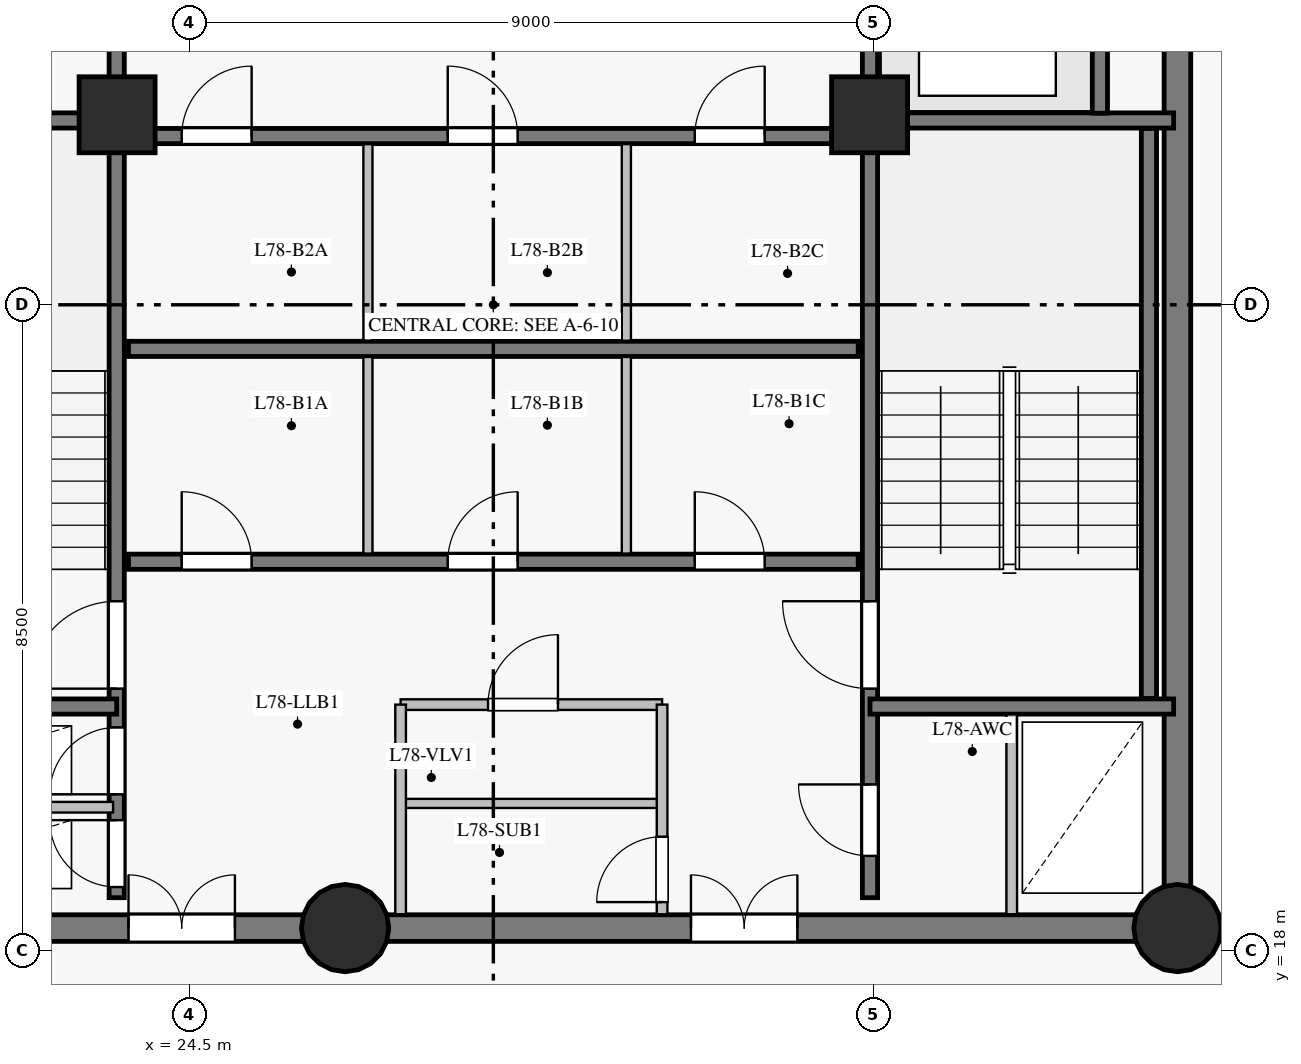
"""IFC4 building model, lengths in metres.
Left out: names, types, materials, properties, quantities, classifications, styles, units other than length and angle.
Written with IfcOpenShell. Run it as: python <this file> out.ifc"""

import sys

from ifc_helpers import new_model, si_unit, direction, frame, frame_2d, origin, origin_with_axes, origin_2d, place, context, subcontext, project, spatial, rectangle, circle, extrude, source, transform, mapped, element, fill, save


model = new_model("IFC4")
c1 = context("Model", 3, precision=1e-05, world=origin(), true_north=direction((0.0, 1.0)))
c2 = subcontext(c1, "Body", "Model", "MODEL_VIEW")
j1 = project(units=[si_unit("LENGTHUNIT", "METRE"), si_unit("PLANEANGLEUNIT", "RADIAN")], contexts=[c1])
p1 = place(None, origin())
s1 = spatial("IfcSite", under=j1, at=p1, CompositionType="ELEMENT")
p2 = place(p1, origin())
s2 = spatial("IfcBuilding", under=s1, at=p2, CompositionType="ELEMENT")
p3 = place(p2, frame((0.0, 0.0, 262.65)))
s3 = spatial("IfcBuildingStorey", under=s2, at=p3, CompositionType="ELEMENT", Elevation=262.65)
p4 = place(p3, frame((19.5, 18.3, 0.0), z_axis=(0.0, 0.0, 1.0), x_axis=(1.0, 0.0, 0.0)))
e1 = element("IfcWall", 1, at=p4, inside=s3, PredefinedType="SHEAR", context=c2, shape_type="SweptSolid", body=[
    extrude(rectangle(XDim=7.05, YDim=0.35, at=frame_2d((3.525, 0.0))), origin(), (0.0, 0.0, 1.0), 2.85),
])
p5 = place(p4, frame((4.2, 0.0, 0.0)))
e2 = element("IfcOpeningElement", 2, at=p5, cuts=e1, PredefinedType="OPENING", context=c2, shape_type="SweptSolid", body=[
    extrude(rectangle(XDim=1.4, YDim=2.2, at=frame_2d((0.7, 1.1))), frame((0.0, 0.185, 0.0), z_axis=(0.0, -1.0, 0.0), x_axis=(1.0, 0.0, 0.0)), (0.0, 0.0, 1.0), 0.37),
])
p6 = place(p3, frame((26.55, 18.3, 0.0), z_axis=(0.0, 0.0, 1.0), x_axis=(1.0, 0.0, 0.0)))
e3 = element("IfcWall", 3, at=p6, inside=s3, PredefinedType="SHEAR", context=c2, shape_type="SweptSolid", body=[
    extrude(rectangle(XDim=10.95, YDim=0.35, at=frame_2d((5.475, 0.0))), origin(), (0.0, 0.0, 1.0), 2.85),
])
p7 = place(p6, frame((4.55, 0.0, 0.0)))
e4 = element("IfcOpeningElement", 4, at=p7, cuts=e3, PredefinedType="OPENING", context=c2, shape_type="SweptSolid", body=[
    extrude(rectangle(XDim=1.4, YDim=2.2, at=frame_2d((0.7, 1.1))), frame((0.0, 0.185, 0.0), z_axis=(0.0, -1.0, 0.0), x_axis=(1.0, 0.0, 0.0)), (0.0, 0.0, 1.0), 0.37),
])
p8 = place(p3, frame((37.5, 18.3, 0.0), z_axis=(0.0, 0.0, 1.0), x_axis=(0.0, 1.0, 0.0)))
e5 = element("IfcWall", 5, at=p8, inside=s3, PredefinedType="SHEAR", context=c2, shape_type="SweptSolid", body=[
    extrude(rectangle(XDim=16.4, YDim=0.35, at=frame_2d((8.2, 0.0))), origin(), (0.0, 0.0, 1.0), 2.85),
])
p9 = place(p8, frame((13.85, 0.0, 0.0)))
e6 = element("IfcOpeningElement", 6, at=p9, cuts=e5, PredefinedType="OPENING", context=c2, shape_type="SweptSolid", body=[
    extrude(rectangle(XDim=1.2, YDim=2.15, at=frame_2d((0.6, 1.075))), frame((0.0, 0.185, 0.0), z_axis=(0.0, -1.0, 0.0), x_axis=(1.0, 0.0, 0.0)), (0.0, 0.0, 1.0), 0.37),
])
m1 = source(origin_with_axes(), c2, "Body", "SweptSolid", [
    extrude(circle(Radius=0.575, at=origin_2d()), origin(), (0.0, 0.0, 1.0), 3.05),
])
for number, where, z_axis, x_axis in (
    (7, (26.55, 18.3, 0.0), (0.0, 0.0, 1.0), (1.0, 0.0, 0.0)),
    (8, (37.5, 18.3, 0.0), (0.0, 0.0, 1.0), (1.0, 0.0, 0.0)),
):
    element("IfcColumn", number, at=place(p3, frame(where, z_axis=z_axis, x_axis=x_axis)), inside=s3, PredefinedType="COLUMN", context=c2, shape_type="MappedRepresentation", body=[
        mapped(m1, transform((0.0, 0.0, 0.0), scale=1.0)),
    ])
m2 = source(origin_with_axes(), c2, "Body", "SweptSolid", [
    extrude(rectangle(XDim=1.0, YDim=1.0, at=origin_2d()), origin(), (0.0, 0.0, 1.0), 3.05),
])
for number, where, z_axis, x_axis in (
    (9, (23.55, 29.0, 0.0), (0.0, 0.0, 1.0), (1.0, 0.0, 0.0)),
    (10, (33.45, 29.0, 0.0), (0.0, 0.0, 1.0), (1.0, 0.0, 0.0)),
):
    element("IfcColumn", number, at=place(p3, frame(where, z_axis=z_axis, x_axis=x_axis)), inside=s3, PredefinedType="COLUMN", context=c2, shape_type="MappedRepresentation", body=[
        mapped(m2, transform((0.0, 0.0, 0.0), scale=1.0)),
    ])
p10 = place(p3, frame((23.545, 18.7, 0.0), z_axis=(0.0, 0.0, 1.0), x_axis=(0.0, 1.0, 0.0)))
e11 = element("IfcWall", 11, at=p10, inside=s3, PredefinedType="SHEAR", context=c2, shape_type="SweptSolid", body=[
    extrude(rectangle(XDim=15.6, YDim=0.2, at=frame_2d((7.8, 0.0))), origin(), (0.0, 0.0, 1.0), 2.85),
])
p11 = place(p10, frame((2.75, 0.0, 0.0)))
e12 = element("IfcOpeningElement", 12, at=p11, cuts=e11, PredefinedType="OPENING", context=c2, shape_type="SweptSolid", body=[
    extrude(rectangle(XDim=1.15, YDim=2.15, at=frame_2d((0.575, 1.075))), frame((0.0, 0.11, 0.0), z_axis=(0.0, -1.0, 0.0), x_axis=(1.0, 0.0, 0.0)), (0.0, 0.0, 1.0), 0.22),
])
p12 = place(p10, frame((0.14, 0.0, 0.0)))
e13 = element("IfcOpeningElement", 13, at=p12, cuts=e11, PredefinedType="OPENING", context=c2, shape_type="SweptSolid", body=[
    extrude(rectangle(XDim=0.88, YDim=2.1, at=frame_2d((0.44, 1.05))), frame((0.0, 0.11, 0.0), z_axis=(0.0, -1.0, 0.0), x_axis=(1.0, 0.0, 0.0)), (0.0, 0.0, 1.0), 0.22),
])
p13 = place(p10, frame((1.36, 0.0, 0.0)))
e14 = element("IfcOpeningElement", 14, at=p13, cuts=e11, PredefinedType="OPENING", context=c2, shape_type="SweptSolid", body=[
    extrude(rectangle(XDim=0.88, YDim=2.1, at=frame_2d((0.44, 1.05))), frame((0.0, 0.11, 0.0), z_axis=(0.0, -1.0, 0.0), x_axis=(1.0, 0.0, 0.0)), (0.0, 0.0, 1.0), 0.22),
])
p14 = place(p10, frame((12.1, 0.0, 0.0)))
e15 = element("IfcOpeningElement", 15, at=p14, cuts=e11, PredefinedType="OPENING", context=c2, shape_type="SweptSolid", body=[
    extrude(rectangle(XDim=1.12, YDim=2.15, at=frame_2d((0.56, 1.075))), frame((0.0, 0.11, 0.0), z_axis=(0.0, -1.0, 0.0), x_axis=(1.0, 0.0, 0.0)), (0.0, 0.0, 1.0), 0.22),
])
p15 = place(p10, frame((14.05, 0.0, 0.0)))
e16 = element("IfcOpeningElement", 16, at=p15, cuts=e11, PredefinedType="OPENING", context=c2, shape_type="SweptSolid", body=[
    extrude(rectangle(XDim=1.12, YDim=2.15, at=frame_2d((0.56, 1.075))), frame((0.0, 0.11, 0.0), z_axis=(0.0, -1.0, 0.0), x_axis=(1.0, 0.0, 0.0)), (0.0, 0.0, 1.0), 0.22),
])
p16 = place(p3, frame((33.455, 18.7, 0.0), z_axis=(0.0, 0.0, 1.0), x_axis=(0.0, 1.0, 0.0)))
e17 = element("IfcWall", 17, at=p16, inside=s3, PredefinedType="SHEAR", context=c2, shape_type="SweptSolid", body=[
    extrude(rectangle(XDim=15.6, YDim=0.2, at=frame_2d((7.8, 0.0))), origin(), (0.0, 0.0, 1.0), 2.85),
])
p17 = place(p16, frame((2.75, 0.0, 0.0)))
e18 = element("IfcOpeningElement", 18, at=p17, cuts=e17, PredefinedType="OPENING", context=c2, shape_type="SweptSolid", body=[
    extrude(rectangle(XDim=1.15, YDim=2.15, at=frame_2d((0.575, 1.075))), frame((0.0, 0.11, 0.0), z_axis=(0.0, -1.0, 0.0), x_axis=(1.0, 0.0, 0.0)), (0.0, 0.0, 1.0), 0.22),
])
p18 = place(p16, frame((0.55, 0.0, 0.0)))
e19 = element("IfcOpeningElement", 19, at=p18, cuts=e17, PredefinedType="OPENING", context=c2, shape_type="SweptSolid", body=[
    extrude(rectangle(XDim=0.94, YDim=2.1, at=frame_2d((0.47, 1.05))), frame((0.0, 0.11, 0.0), z_axis=(0.0, -1.0, 0.0), x_axis=(1.0, 0.0, 0.0)), (0.0, 0.0, 1.0), 0.22),
])
p19 = place(p3, frame((23.7, 23.12, 0.0), z_axis=(0.0, 0.0, 1.0), x_axis=(1.0, 0.0, 0.0)))
e20 = element("IfcWall", 20, at=p19, inside=s3, PredefinedType="SHEAR", context=c2, shape_type="SweptSolid", body=[
    extrude(rectangle(XDim=9.6, YDim=0.2, at=frame_2d((4.8, 0.0))), origin(), (0.0, 0.0, 1.0), 2.85),
])
p20 = place(p19, frame((0.7, 0.0, 0.0)))
e21 = element("IfcOpeningElement", 21, at=p20, cuts=e20, PredefinedType="OPENING", context=c2, shape_type="SweptSolid", body=[
    extrude(rectangle(XDim=0.92, YDim=2.1, at=frame_2d((0.46, 1.05))), frame((0.0, 0.11, 0.0), z_axis=(0.0, -1.0, 0.0), x_axis=(1.0, 0.0, 0.0)), (0.0, 0.0, 1.0), 0.22),
])
p21 = place(p19, frame((4.2, 0.0, 0.0)))
e22 = element("IfcOpeningElement", 22, at=p21, cuts=e20, PredefinedType="OPENING", context=c2, shape_type="SweptSolid", body=[
    extrude(rectangle(XDim=0.92, YDim=2.1, at=frame_2d((0.46, 1.05))), frame((0.0, 0.11, 0.0), z_axis=(0.0, -1.0, 0.0), x_axis=(1.0, 0.0, 0.0)), (0.0, 0.0, 1.0), 0.22),
])
p22 = place(p19, frame((7.45, 0.0, 0.0)))
e23 = element("IfcOpeningElement", 23, at=p22, cuts=e20, PredefinedType="OPENING", context=c2, shape_type="SweptSolid", body=[
    extrude(rectangle(XDim=0.92, YDim=2.1, at=frame_2d((0.46, 1.05))), frame((0.0, 0.11, 0.0), z_axis=(0.0, -1.0, 0.0), x_axis=(1.0, 0.0, 0.0)), (0.0, 0.0, 1.0), 0.22),
])
p23 = place(p3, frame((23.7, 25.92, 0.0), z_axis=(0.0, 0.0, 1.0), x_axis=(1.0, 0.0, 0.0)))
e24 = element("IfcWall", 24, at=p23, inside=s3, PredefinedType="SHEAR", context=c2, shape_type="SweptSolid", body=[
    extrude(rectangle(XDim=9.6, YDim=0.2, at=frame_2d((4.8, 0.0))), origin(), (0.0, 0.0, 1.0), 2.85),
])
p24 = place(p3, frame((23.7, 28.72, 0.0), z_axis=(0.0, 0.0, 1.0), x_axis=(1.0, 0.0, 0.0)))
e25 = element("IfcWall", 25, at=p24, inside=s3, PredefinedType="SHEAR", context=c2, shape_type="SweptSolid", body=[
    extrude(rectangle(XDim=9.6, YDim=0.2, at=frame_2d((4.8, 0.0))), origin(), (0.0, 0.0, 1.0), 2.85),
])
p25 = place(p24, frame((0.7, 0.0, 0.0)))
e26 = element("IfcOpeningElement", 26, at=p25, cuts=e25, PredefinedType="OPENING", context=c2, shape_type="SweptSolid", body=[
    extrude(rectangle(XDim=0.92, YDim=2.1, at=frame_2d((0.46, 1.05))), frame((0.0, 0.11, 0.0), z_axis=(0.0, -1.0, 0.0), x_axis=(1.0, 0.0, 0.0)), (0.0, 0.0, 1.0), 0.22),
])
p26 = place(p24, frame((4.2, 0.0, 0.0)))
e27 = element("IfcOpeningElement", 27, at=p26, cuts=e25, PredefinedType="OPENING", context=c2, shape_type="SweptSolid", body=[
    extrude(rectangle(XDim=0.92, YDim=2.1, at=frame_2d((0.46, 1.05))), frame((0.0, 0.11, 0.0), z_axis=(0.0, -1.0, 0.0), x_axis=(1.0, 0.0, 0.0)), (0.0, 0.0, 1.0), 0.22),
])
p27 = place(p24, frame((7.45, 0.0, 0.0)))
e28 = element("IfcOpeningElement", 28, at=p27, cuts=e25, PredefinedType="OPENING", context=c2, shape_type="SweptSolid", body=[
    extrude(rectangle(XDim=0.92, YDim=2.1, at=frame_2d((0.46, 1.05))), frame((0.0, 0.11, 0.0), z_axis=(0.0, -1.0, 0.0), x_axis=(1.0, 0.0, 0.0)), (0.0, 0.0, 1.0), 0.22),
])
p28 = place(p3, frame((37.125, 21.32, 0.0), z_axis=(0.0, 0.0, 1.0), x_axis=(0.0, 1.0, 0.0)))
e29 = element("IfcWall", 29, at=p28, inside=s3, PredefinedType="SHEAR", context=c2, shape_type="SweptSolid", body=[
    extrude(rectangle(XDim=7.5, YDim=0.2, at=frame_2d((3.75, 0.0))), origin(), (0.0, 0.0, 1.0), 2.85),
])
for number, where, z_axis, x_axis in (
    (30, (33.455, 21.215, 0.0), (0.0, 0.0, 1.0), (1.0, 0.0, 0.0)),
    (31, (33.455, 28.925, 0.0), (0.0, 0.0, 1.0), (1.0, 0.0, 0.0)),
    (32, (19.55, 21.215, 0.0), (0.0, 0.0, 1.0), (1.0, 0.0, 0.0)),
    (33, (19.55, 28.925, 0.0), (0.0, 0.0, 1.0), (1.0, 0.0, 0.0)),
):
    element("IfcWall", number, at=place(p3, frame(where, z_axis=z_axis, x_axis=x_axis)), inside=s3, PredefinedType="SHEAR", context=c2, shape_type="SweptSolid", body=[
        extrude(rectangle(XDim=3.995, YDim=0.2, at=frame_2d((1.998, 0.0))), origin(), (0.0, 0.0, 1.0), 2.85),
    ])
p29 = place(p3, frame((36.48, 29.02, 0.0), z_axis=(0.0, 0.0, 1.0), x_axis=(0.0, 1.0, 0.0)))
e34 = element("IfcWall", 34, at=p29, inside=s3, PredefinedType="SHEAR", context=c2, shape_type="SweptSolid", body=[
    extrude(rectangle(XDim=2.86, YDim=0.2, at=frame_2d((1.43, 0.0))), origin(), (0.0, 0.0, 1.0), 2.85),
])
p30 = place(p3, frame((19.682, 19.89, 0.0), z_axis=(0.0, 0.0, 1.0), x_axis=(1.0, 0.0, 0.0)))
e35 = element("IfcWall", 35, at=p30, inside=s3, PredefinedType="PARTITIONING", context=c2, shape_type="SweptSolid", body=[
    extrude(rectangle(XDim=3.815, YDim=0.14, at=frame_2d((1.908, 0.0))), origin(), (0.0, 0.0, 1.0), 2.85),
])
p31 = place(p3, frame((27.28, 21.24, 0.0), z_axis=(0.0, 0.0, 1.0), x_axis=(1.0, 0.0, 0.0)))
e36 = element("IfcWall", 36, at=p31, inside=s3, PredefinedType="PARTITIONING", context=c2, shape_type="SweptSolid", body=[
    extrude(rectangle(XDim=3.44, YDim=0.14, at=frame_2d((1.72, 0.0))), origin(), (0.0, 0.0, 1.0), 2.85),
])
p32 = place(p31, frame((1.15, 0.0, 0.0)))
e37 = element("IfcOpeningElement", 37, at=p32, cuts=e36, PredefinedType="OPENING", context=c2, shape_type="SweptSolid", body=[
    extrude(rectangle(XDim=0.92, YDim=2.1, at=frame_2d((0.46, 1.05))), frame((0.0, 0.08, 0.0), z_axis=(0.0, -1.0, 0.0), x_axis=(1.0, 0.0, 0.0)), (0.0, 0.0, 1.0), 0.16),
])
p33 = place(p3, frame((27.28, 19.94, 0.0), z_axis=(0.0, 0.0, 1.0), x_axis=(1.0, 0.0, 0.0)))
e38 = element("IfcWall", 38, at=p33, inside=s3, PredefinedType="PARTITIONING", context=c2, shape_type="SweptSolid", body=[
    extrude(rectangle(XDim=3.44, YDim=0.12, at=frame_2d((1.72, 0.0))), origin(), (0.0, 0.0, 1.0), 2.85),
])
p34 = place(p3, frame((27.28, 18.482, 0.0), z_axis=(0.0, 0.0, 1.0), x_axis=(0.0, 1.0, 0.0)))
e39 = element("IfcWall", 39, at=p34, inside=s3, PredefinedType="PARTITIONING", context=c2, shape_type="SweptSolid", body=[
    extrude(rectangle(XDim=2.758, YDim=0.14, at=frame_2d((1.379, 0.0))), origin(), (0.0, 0.0, 1.0), 2.85),
])
p35 = place(p3, frame((30.72, 18.482, 0.0), z_axis=(0.0, 0.0, 1.0), x_axis=(0.0, 1.0, 0.0)))
e40 = element("IfcWall", 40, at=p35, inside=s3, PredefinedType="PARTITIONING", context=c2, shape_type="SweptSolid", body=[
    extrude(rectangle(XDim=2.758, YDim=0.14, at=frame_2d((1.379, 0.0))), origin(), (0.0, 0.0, 1.0), 2.85),
])
p36 = place(p35, frame((0.16, 0.0, 0.0)))
e41 = element("IfcOpeningElement", 41, at=p36, cuts=e40, PredefinedType="OPENING", context=c2, shape_type="SweptSolid", body=[
    extrude(rectangle(XDim=0.86, YDim=2.1, at=frame_2d((0.43, 1.05))), frame((0.0, 0.08, 0.0), z_axis=(0.0, -1.0, 0.0), x_axis=(1.0, 0.0, 0.0)), (0.0, 0.0, 1.0), 0.16),
])
for number, where, z_axis, x_axis in (
    (42, (26.85, 23.227, 0.0), (0.0, 0.0, 1.0), (0.0, 1.0, 0.0)),
    (43, (30.25, 23.227, 0.0), (0.0, 0.0, 1.0), (0.0, 1.0, 0.0)),
    (44, (26.85, 26.027, 0.0), (0.0, 0.0, 1.0), (0.0, 1.0, 0.0)),
    (45, (30.25, 26.027, 0.0), (0.0, 0.0, 1.0), (0.0, 1.0, 0.0)),
):
    element("IfcWall", number, at=place(p3, frame(where, z_axis=z_axis, x_axis=x_axis)), inside=s3, PredefinedType="PARTITIONING", context=c2, shape_type="SweptSolid", body=[
        extrude(rectangle(XDim=2.587, YDim=0.12, at=frame_2d((1.293, 0.0))), origin(), (0.0, 0.0, 1.0), 2.85),
    ])
p37 = place(p3, frame((35.32, 18.482, 0.0), z_axis=(0.0, 0.0, 1.0), x_axis=(0.0, 1.0, 0.0)))
e46 = element("IfcWall", 46, at=p37, inside=s3, PredefinedType="PARTITIONING", context=c2, shape_type="SweptSolid", body=[
    extrude(rectangle(XDim=2.629, YDim=0.14, at=frame_2d((1.314, 0.0))), origin(), (0.0, 0.0, 1.0), 2.85),
])
m3 = source(origin_with_axes(), c2, "Body", "SweptSolid", [
    extrude(rectangle(XDim=1.15, YDim=2.15, at=frame_2d((0.575, 1.075))), frame((0.0, 0.025, 0.0), z_axis=(0.0, -1.0, 0.0), x_axis=(1.0, 0.0, 0.0)), (0.0, 0.0, 1.0), 0.05),
])
p38 = place(p11, origin())
e47 = element("IfcDoor", 47, at=p38, inside=s3, OperationType="SINGLE_SWING_LEFT", PredefinedType="DOOR", context=c2, shape_type="MappedRepresentation", body=[
    mapped(m3, transform((0.0, 0.0, 0.0), scale=1.0)),
])
fill(e12, e47)
p39 = place(p17, origin())
e48 = element("IfcDoor", 48, at=p39, inside=s3, OperationType="SINGLE_SWING_RIGHT", PredefinedType="DOOR", context=c2, shape_type="MappedRepresentation", body=[
    mapped(m3, transform((0.0, 0.0, 0.0), scale=1.0)),
])
fill(e18, e48)
m4 = source(origin_with_axes(), c2, "Body", "SweptSolid", [
    extrude(rectangle(XDim=0.88, YDim=2.1, at=frame_2d((0.44, 1.05))), frame((0.0, 0.025, 0.0), z_axis=(0.0, -1.0, 0.0), x_axis=(1.0, 0.0, 0.0)), (0.0, 0.0, 1.0), 0.05),
])
p40 = place(p12, origin())
e49 = element("IfcDoor", 49, at=p40, inside=s3, OperationType="SINGLE_SWING_RIGHT", PredefinedType="DOOR", context=c2, shape_type="MappedRepresentation", body=[
    mapped(m4, transform((0.0, 0.0, 0.0), scale=1.0)),
])
fill(e13, e49)
p41 = place(p13, origin())
e50 = element("IfcDoor", 50, at=p41, inside=s3, OperationType="SINGLE_SWING_LEFT", PredefinedType="DOOR", context=c2, shape_type="MappedRepresentation", body=[
    mapped(m4, transform((0.0, 0.0, 0.0), scale=1.0)),
])
fill(e14, e50)
m5 = source(origin_with_axes(), c2, "Body", "SweptSolid", [
    extrude(rectangle(XDim=1.4, YDim=2.2, at=frame_2d((0.7, 1.1))), frame((0.0, 0.025, 0.0), z_axis=(0.0, -1.0, 0.0), x_axis=(1.0, 0.0, 0.0)), (0.0, 0.0, 1.0), 0.05),
])
p42 = place(p5, origin())
e51 = element("IfcDoor", 51, at=p42, inside=s3, OperationType="DOUBLE_DOOR_SINGLE_SWING", PredefinedType="DOOR", context=c2, shape_type="MappedRepresentation", body=[
    mapped(m5, transform((0.0, 0.0, 0.0), scale=1.0)),
])
fill(e2, e51)
p43 = place(p7, origin())
e52 = element("IfcDoor", 52, at=p43, inside=s3, OperationType="DOUBLE_DOOR_SINGLE_SWING", PredefinedType="DOOR", context=c2, shape_type="MappedRepresentation", body=[
    mapped(m5, transform((0.0, 0.0, 0.0), scale=1.0)),
])
fill(e4, e52)
m6 = source(origin_with_axes(), c2, "Body", "SweptSolid", [
    extrude(rectangle(XDim=0.94, YDim=2.1, at=frame_2d((0.47, 1.05))), frame((0.0, 0.025, 0.0), z_axis=(0.0, -1.0, 0.0), x_axis=(1.0, 0.0, 0.0)), (0.0, 0.0, 1.0), 0.05),
])
p44 = place(p18, origin())
e53 = element("IfcDoor", 53, at=p44, inside=s3, OperationType="SINGLE_SWING_RIGHT", PredefinedType="DOOR", context=c2, shape_type="MappedRepresentation", body=[
    mapped(m6, transform((0.0, 0.0, 0.0), scale=1.0)),
])
fill(e19, e53)
m7 = source(origin_with_axes(), c2, "Body", "SweptSolid", [
    extrude(rectangle(XDim=0.86, YDim=2.1, at=frame_2d((0.43, 1.05))), frame((0.0, 0.025, 0.0), z_axis=(0.0, -1.0, 0.0), x_axis=(1.0, 0.0, 0.0)), (0.0, 0.0, 1.0), 0.05),
])
p45 = place(p36, origin())
e54 = element("IfcDoor", 54, at=p45, inside=s3, OperationType="SINGLE_SWING_LEFT", PredefinedType="DOOR", context=c2, shape_type="MappedRepresentation", body=[
    mapped(m7, transform((0.0, 0.0, 0.0), scale=1.0)),
])
fill(e41, e54)
m8 = source(origin_with_axes(), c2, "Body", "SweptSolid", [
    extrude(rectangle(XDim=0.92, YDim=2.1, at=frame_2d((0.46, 1.05))), frame((0.0, 0.025, 0.0), z_axis=(0.0, -1.0, 0.0), x_axis=(1.0, 0.0, 0.0)), (0.0, 0.0, 1.0), 0.05),
])
p46 = place(p32, origin())
e55 = element("IfcDoor", 55, at=p46, inside=s3, OperationType="SINGLE_SWING_RIGHT", PredefinedType="DOOR", context=c2, shape_type="MappedRepresentation", body=[
    mapped(m8, transform((0.0, 0.0, 0.0), scale=1.0)),
])
fill(e37, e55)
p47 = place(p20, origin())
e56 = element("IfcDoor", 56, at=p47, inside=s3, OperationType="SINGLE_SWING_LEFT", PredefinedType="DOOR", context=c2, shape_type="MappedRepresentation", body=[
    mapped(m8, transform((0.0, 0.0, 0.0), scale=1.0)),
])
fill(e21, e56)
p48 = place(p21, origin())
e57 = element("IfcDoor", 57, at=p48, inside=s3, OperationType="SINGLE_SWING_RIGHT", PredefinedType="DOOR", context=c2, shape_type="MappedRepresentation", body=[
    mapped(m8, transform((0.0, 0.0, 0.0), scale=1.0)),
])
fill(e22, e57)
p49 = place(p22, origin())
e58 = element("IfcDoor", 58, at=p49, inside=s3, OperationType="SINGLE_SWING_LEFT", PredefinedType="DOOR", context=c2, shape_type="MappedRepresentation", body=[
    mapped(m8, transform((0.0, 0.0, 0.0), scale=1.0)),
])
fill(e23, e58)
p50 = place(p25, origin())
e59 = element("IfcDoor", 59, at=p50, inside=s3, OperationType="SINGLE_SWING_RIGHT", PredefinedType="DOOR", context=c2, shape_type="MappedRepresentation", body=[
    mapped(m8, transform((0.0, 0.0, 0.0), scale=1.0)),
])
fill(e26, e59)
p51 = place(p26, origin())
e60 = element("IfcDoor", 60, at=p51, inside=s3, OperationType="SINGLE_SWING_LEFT", PredefinedType="DOOR", context=c2, shape_type="MappedRepresentation", body=[
    mapped(m8, transform((0.0, 0.0, 0.0), scale=1.0)),
])
fill(e27, e60)
p52 = place(p27, origin())
e61 = element("IfcDoor", 61, at=p52, inside=s3, OperationType="SINGLE_SWING_RIGHT", PredefinedType="DOOR", context=c2, shape_type="MappedRepresentation", body=[
    mapped(m8, transform((0.0, 0.0, 0.0), scale=1.0)),
])
fill(e28, e61)
save(model, sys.argv[1])
